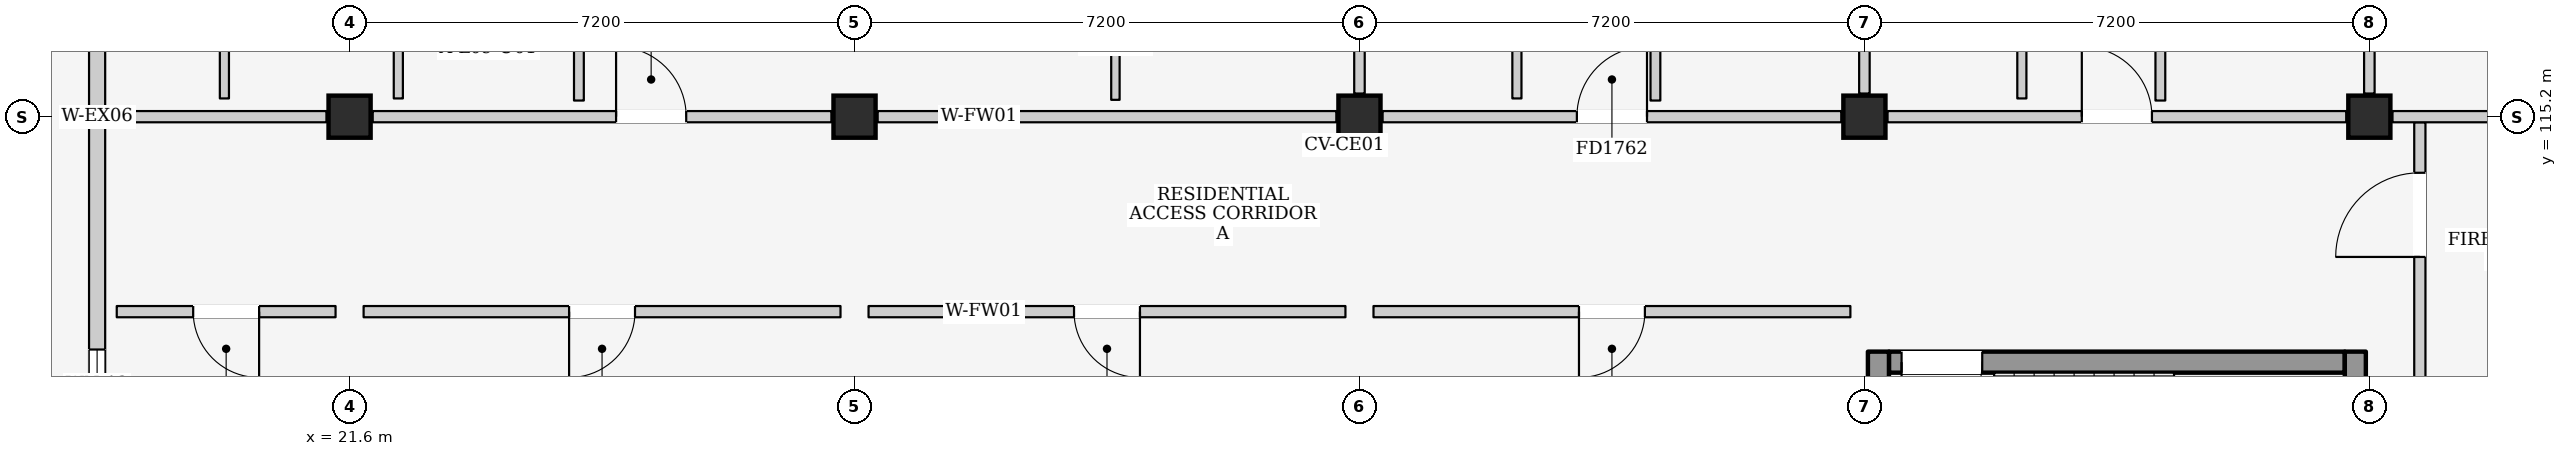
"""IFC4 building model, lengths in metres.
Left out: names, types, materials, properties, quantities, classifications, styles, units other than length and angle.
Written with IfcOpenShell. Run it as: python <this file> out.ifc"""

import sys

from ifc_helpers import new_model, si_unit, direction, frame, frame_2d, origin, origin_2d, place, context, subcontext, project, spatial, rectangle, extrude, element, fill, save


model = new_model("IFC4")
c1 = context("Model", 3, precision=1e-05, world=origin(), true_north=direction((0.0, 1.0)))
c2 = subcontext(c1, "Body", "Model", "MODEL_VIEW")
j1 = project(units=[si_unit("LENGTHUNIT", "METRE"), si_unit("PLANEANGLEUNIT", "RADIAN")], contexts=[c1])
p1 = place(None, origin())
s1 = spatial("IfcSite", under=j1, at=p1, CompositionType="ELEMENT")
p2 = place(p1, origin())
s2 = spatial("IfcBuilding", under=s1, at=p2, CompositionType="ELEMENT")
p3 = place(p2, frame((0.0, 0.0, 31.5)))
s3 = spatial("IfcBuildingStorey", under=s2, at=p3, CompositionType="ELEMENT", Elevation=31.5)
for number, where, z_axis, x_axis in (
    (1, (21.6, 115.2, 0.0), (0.0, 0.0, 1.0), (1.0, 0.0, 0.0)),
    (2, (28.8, 115.2, 0.0), (0.0, 0.0, 1.0), (1.0, 0.0, 0.0)),
    (3, (36.0, 115.2, 0.0), (0.0, 0.0, 1.0), (1.0, 0.0, 0.0)),
    (4, (43.2, 115.2, 0.0), (0.0, 0.0, 1.0), (1.0, 0.0, 0.0)),
    (5, (50.4, 115.2, 0.0), (0.0, 0.0, 1.0), (1.0, 0.0, 0.0)),
):
    element("IfcColumn", number, at=place(p3, frame(where, z_axis=z_axis, x_axis=x_axis)), inside=s3, PredefinedType="COLUMN", context=c2, shape_type="SweptSolid", body=[
        extrude(rectangle(XDim=0.6, YDim=0.6, at=origin_2d()), origin(), (0.0, 0.0, 1.0), 3.3),
    ])
p4 = place(p3, frame((18.0, 108.13, 0.0), z_axis=(0.0, 0.0, 1.0), x_axis=(0.0, 1.0, 0.0)))
e6 = element("IfcWall", 6, at=p4, inside=s3, PredefinedType="ELEMENTEDWALL", context=c2, shape_type="SweptSolid", body=[
    extrude(rectangle(XDim=7.07, YDim=0.23, at=frame_2d((3.535, 0.0))), origin(), (0.0, 0.0, 1.0), 2.515),
])
p5 = place(p4, frame((2.75, 0.0, 1.1)))
e7 = element("IfcOpeningElement", 7, at=p5, cuts=e6, PredefinedType="OPENING", context=c2, shape_type="SweptSolid", body=[
    extrude(rectangle(XDim=1.0, YDim=0.9, at=frame_2d((0.5, 0.45))), frame((0.0, 0.13, 0.0), z_axis=(0.0, -1.0, 0.0), x_axis=(1.0, 0.0, 0.0)), (0.0, 0.0, 1.0), 0.26),
])
p6 = place(p3, frame((18.0, 115.2, 0.0), z_axis=(0.0, 0.0, 1.0), x_axis=(0.0, 1.0, 0.0)))
e8 = element("IfcWall", 8, at=p6, inside=s3, PredefinedType="ELEMENTEDWALL", context=c2, shape_type="SweptSolid", body=[
    extrude(rectangle(XDim=7.07, YDim=0.23, at=frame_2d((3.535, 0.0))), origin(), (0.0, 0.0, 1.0), 2.515),
])
p7 = place(p6, frame((3.6, 0.0, 0.0)))
e9 = element("IfcOpeningElement", 9, at=p7, cuts=e8, PredefinedType="OPENING", context=c2, shape_type="SweptSolid", body=[
    extrude(rectangle(XDim=1.08, YDim=2.12, at=frame_2d((0.54, 1.06))), frame((0.0, 0.13, 0.0), z_axis=(0.0, -1.0, 0.0), x_axis=(1.0, 0.0, 0.0)), (0.0, 0.0, 1.0), 0.26),
])
p8 = place(p3, frame((43.55, 111.7, 0.0), z_axis=(0.0, 0.0, 1.0), x_axis=(1.0, 0.0, 0.0)))
e10 = element("IfcWall", 10, at=p8, inside=s3, PredefinedType="SHEAR", context=c2, shape_type="SweptSolid", body=[
    extrude(rectangle(XDim=6.5, YDim=0.3, at=frame_2d((3.25, 0.0))), origin(), (0.0, 0.0, 1.0), 3.08),
])
p9 = place(p8, frame((0.18, 0.0, 0.0)))
e11 = element("IfcOpeningElement", 11, at=p9, cuts=e10, PredefinedType="OPENING", context=c2, shape_type="SweptSolid", body=[
    extrude(rectangle(XDim=1.15, YDim=2.2, at=frame_2d((0.575, 1.1))), frame((0.0, 0.165, 0.0), z_axis=(0.0, -1.0, 0.0), x_axis=(1.0, 0.0, 0.0)), (0.0, 0.0, 1.0), 0.33),
])
for number, where, z_axis, x_axis in (
    (12, (43.4, 108.15, 0.0), (0.0, 0.0, 1.0), (0.0, 1.0, 0.0)),
    (13, (50.2, 108.15, 0.0), (0.0, 0.0, 1.0), (0.0, 1.0, 0.0)),
):
    element("IfcWall", number, at=place(p3, frame(where, z_axis=z_axis, x_axis=x_axis)), inside=s3, PredefinedType="SHEAR", context=c2, shape_type="SweptSolid", body=[
        extrude(rectangle(XDim=3.7, YDim=0.3, at=frame_2d((1.85, 0.0))), origin(), (0.0, 0.0, 1.0), 3.08),
    ])
p10 = place(p3, frame((51.12, 111.1, 0.0), z_axis=(0.0, 0.0, 1.0), x_axis=(0.0, 1.0, 0.0)))
e14 = element("IfcWall", 14, at=p10, inside=s3, PredefinedType="PARTITIONING", context=c2, shape_type="SweptSolid", body=[
    extrude(rectangle(XDim=4.02, YDim=0.16, at=frame_2d((2.01, 0.0))), origin(), (0.0, 0.0, 1.0), 3.08),
])
p11 = place(p10, frame((2.1, 0.0, 0.0)))
e15 = element("IfcOpeningElement", 15, at=p11, cuts=e14, PredefinedType="OPENING", context=c2, shape_type="SweptSolid", body=[
    extrude(rectangle(XDim=1.2, YDim=2.2, at=frame_2d((0.6, 1.1))), frame((0.0, 0.095, 0.0), z_axis=(0.0, -1.0, 0.0), x_axis=(1.0, 0.0, 0.0)), (0.0, 0.0, 1.0), 0.19),
])
p12 = place(p3, frame((18.28, 115.2, 0.0), z_axis=(0.0, 0.0, 1.0), x_axis=(1.0, 0.0, 0.0)))
e16 = element("IfcWall", 16, at=p12, inside=s3, PredefinedType="PARTITIONING", context=c2, shape_type="SweptSolid", body=[
    extrude(rectangle(XDim=2.99, YDim=0.16, at=frame_2d((1.495, 0.0))), origin(), (0.0, 0.0, 1.0), 2.415),
])
p13 = place(p3, frame((21.93, 115.2, 0.0), z_axis=(0.0, 0.0, 1.0), x_axis=(1.0, 0.0, 0.0)))
e17 = element("IfcWall", 17, at=p13, inside=s3, PredefinedType="PARTITIONING", context=c2, shape_type="SweptSolid", body=[
    extrude(rectangle(XDim=6.54, YDim=0.16, at=frame_2d((3.27, 0.0))), origin(), (0.0, 0.0, 1.0), 2.415),
])
p14 = place(p13, frame((3.47, 0.0, 0.0)))
e18 = element("IfcOpeningElement", 18, at=p14, cuts=e17, PredefinedType="OPENING", context=c2, shape_type="SweptSolid", body=[
    extrude(rectangle(XDim=1.0, YDim=2.15, at=frame_2d((0.5, 1.075))), frame((0.0, 0.095, 0.0), z_axis=(0.0, -1.0, 0.0), x_axis=(1.0, 0.0, 0.0)), (0.0, 0.0, 1.0), 0.19),
])
p15 = place(p3, frame((29.13, 115.2, 0.0), z_axis=(0.0, 0.0, 1.0), x_axis=(1.0, 0.0, 0.0)))
e19 = element("IfcWall", 19, at=p15, inside=s3, PredefinedType="PARTITIONING", context=c2, shape_type="SweptSolid", body=[
    extrude(rectangle(XDim=6.54, YDim=0.16, at=frame_2d((3.27, 0.0))), origin(), (0.0, 0.0, 1.0), 2.415),
])
p16 = place(p3, frame((36.0, 115.53, 0.0), z_axis=(0.0, 0.0, 1.0), x_axis=(0.0, 1.0, 0.0)))
e20 = element("IfcWall", 20, at=p16, inside=s3, PredefinedType="PARTITIONING", context=c2, shape_type="SweptSolid", body=[
    extrude(rectangle(XDim=6.54, YDim=0.15, at=frame_2d((3.27, 0.0))), origin(), (0.0, 0.0, 1.0), 2.565),
])
for number, where, z_axis, x_axis in (
    (21, (22.295, 115.46, 0.0), (0.0, 0.0, 1.0), (0.0, 1.0, 0.0)),
    (22, (19.815, 115.46, 0.0), (0.0, 0.0, 1.0), (0.0, 1.0, 0.0)),
):
    element("IfcWall", number, at=place(p3, frame(where, z_axis=z_axis, x_axis=x_axis)), inside=s3, PredefinedType="PARTITIONING", context=c2, shape_type="SweptSolid", body=[
        extrude(rectangle(XDim=3.04, YDim=0.13, at=frame_2d((1.52, 0.0))), origin(), (0.0, 0.0, 1.0), 3.08),
    ])
p17 = place(p3, frame((24.87, 115.43, 0.0), z_axis=(0.0, 0.0, 1.0), x_axis=(0.0, 1.0, 0.0)))
e23 = element("IfcWall", 23, at=p17, inside=s3, PredefinedType="PARTITIONING", context=c2, shape_type="SweptSolid", body=[
    extrude(rectangle(XDim=3.06, YDim=0.14, at=frame_2d((1.53, 0.0))), origin(), (0.0, 0.0, 1.0), 3.08),
])
p18 = place(p3, frame((32.52, 115.44, 0.0), z_axis=(0.0, 0.0, 1.0), x_axis=(0.0, 1.0, 0.0)))
e24 = element("IfcWall", 24, at=p18, inside=s3, PredefinedType="PARTITIONING", context=c2, shape_type="SweptSolid", body=[
    extrude(rectangle(XDim=3.04, YDim=0.12, at=frame_2d((1.52, 0.0))), origin(), (0.0, 0.0, 1.0), 3.08),
])
p19 = place(p18, frame((1.04, 0.0, 0.0)))
e25 = element("IfcOpeningElement", 25, at=p19, cuts=e24, PredefinedType="OPENING", context=c2, shape_type="SweptSolid", body=[
    extrude(rectangle(XDim=0.96, YDim=2.15, at=frame_2d((0.48, 1.075))), frame((0.0, 0.075, 0.0), z_axis=(0.0, -1.0, 0.0), x_axis=(1.0, 0.0, 0.0)), (0.0, 0.0, 1.0), 0.15),
])
p20 = place(p3, frame((36.33, 115.2, 0.0), z_axis=(0.0, 0.0, 1.0), x_axis=(1.0, 0.0, 0.0)))
e26 = element("IfcWall", 26, at=p20, inside=s3, PredefinedType="PARTITIONING", context=c2, shape_type="SweptSolid", body=[
    extrude(rectangle(XDim=6.54, YDim=0.16, at=frame_2d((3.27, 0.0))), origin(), (0.0, 0.0, 1.0), 2.415),
])
p21 = place(p20, frame((2.77, 0.0, 0.0)))
e27 = element("IfcOpeningElement", 27, at=p21, cuts=e26, PredefinedType="OPENING", context=c2, shape_type="SweptSolid", body=[
    extrude(rectangle(XDim=1.0, YDim=2.15, at=frame_2d((0.5, 1.075))), frame((0.0, 0.095, 0.0), z_axis=(0.0, -1.0, 0.0), x_axis=(1.0, 0.0, 0.0)), (0.0, 0.0, 1.0), 0.19),
])
p22 = place(p3, frame((43.2, 115.53, 0.0), z_axis=(0.0, 0.0, 1.0), x_axis=(0.0, 1.0, 0.0)))
e28 = element("IfcWall", 28, at=p22, inside=s3, PredefinedType="PARTITIONING", context=c2, shape_type="SweptSolid", body=[
    extrude(rectangle(XDim=6.54, YDim=0.15, at=frame_2d((3.27, 0.0))), origin(), (0.0, 0.0, 1.0), 2.565),
])
p23 = place(p3, frame((38.245, 115.46, 0.0), z_axis=(0.0, 0.0, 1.0), x_axis=(0.0, 1.0, 0.0)))
e29 = element("IfcWall", 29, at=p23, inside=s3, PredefinedType="PARTITIONING", context=c2, shape_type="SweptSolid", body=[
    extrude(rectangle(XDim=2.13, YDim=0.13, at=frame_2d((1.065, 0.0))), origin(), (0.0, 0.0, 1.0), 3.08),
])
p24 = place(p3, frame((40.22, 115.43, 0.0), z_axis=(0.0, 0.0, 1.0), x_axis=(0.0, 1.0, 0.0)))
e30 = element("IfcWall", 30, at=p24, inside=s3, PredefinedType="PARTITIONING", context=c2, shape_type="SweptSolid", body=[
    extrude(rectangle(XDim=2.15, YDim=0.14, at=frame_2d((1.075, 0.0))), origin(), (0.0, 0.0, 1.0), 3.08),
])
p25 = place(p3, frame((43.53, 115.2, 0.0), z_axis=(0.0, 0.0, 1.0), x_axis=(1.0, 0.0, 0.0)))
e31 = element("IfcWall", 31, at=p25, inside=s3, PredefinedType="PARTITIONING", context=c2, shape_type="SweptSolid", body=[
    extrude(rectangle(XDim=6.54, YDim=0.16, at=frame_2d((3.27, 0.0))), origin(), (0.0, 0.0, 1.0), 2.415),
])
p26 = place(p25, frame((2.77, 0.0, 0.0)))
e32 = element("IfcOpeningElement", 32, at=p26, cuts=e31, PredefinedType="OPENING", context=c2, shape_type="SweptSolid", body=[
    extrude(rectangle(XDim=1.0, YDim=2.15, at=frame_2d((0.5, 1.075))), frame((0.0, 0.095, 0.0), z_axis=(0.0, -1.0, 0.0), x_axis=(1.0, 0.0, 0.0)), (0.0, 0.0, 1.0), 0.19),
])
p27 = place(p3, frame((50.4, 115.53, 0.0), z_axis=(0.0, 0.0, 1.0), x_axis=(0.0, 1.0, 0.0)))
e33 = element("IfcWall", 33, at=p27, inside=s3, PredefinedType="PARTITIONING", context=c2, shape_type="SweptSolid", body=[
    extrude(rectangle(XDim=6.54, YDim=0.15, at=frame_2d((3.27, 0.0))), origin(), (0.0, 0.0, 1.0), 2.565),
])
p28 = place(p3, frame((45.445, 115.46, 0.0), z_axis=(0.0, 0.0, 1.0), x_axis=(0.0, 1.0, 0.0)))
e34 = element("IfcWall", 34, at=p28, inside=s3, PredefinedType="PARTITIONING", context=c2, shape_type="SweptSolid", body=[
    extrude(rectangle(XDim=2.13, YDim=0.13, at=frame_2d((1.065, 0.0))), origin(), (0.0, 0.0, 1.0), 3.08),
])
p29 = place(p3, frame((47.42, 115.43, 0.0), z_axis=(0.0, 0.0, 1.0), x_axis=(0.0, 1.0, 0.0)))
e35 = element("IfcWall", 35, at=p29, inside=s3, PredefinedType="PARTITIONING", context=c2, shape_type="SweptSolid", body=[
    extrude(rectangle(XDim=2.15, YDim=0.14, at=frame_2d((1.075, 0.0))), origin(), (0.0, 0.0, 1.0), 3.08),
])
p30 = place(p3, frame((50.73, 115.2, 0.0), z_axis=(0.0, 0.0, 1.0), x_axis=(1.0, 0.0, 0.0)))
e36 = element("IfcWall", 36, at=p30, inside=s3, PredefinedType="PARTITIONING", context=c2, shape_type="SweptSolid", body=[
    extrude(rectangle(XDim=6.54, YDim=0.16, at=frame_2d((3.27, 0.0))), origin(), (0.0, 0.0, 1.0), 2.415),
])
p31 = place(p3, frame((18.28, 112.42, 0.0), z_axis=(0.0, 0.0, 1.0), x_axis=(1.0, 0.0, 0.0)))
e37 = element("IfcWall", 37, at=p31, inside=s3, PredefinedType="PARTITIONING", context=c2, shape_type="SweptSolid", body=[
    extrude(rectangle(XDim=3.12, YDim=0.16, at=frame_2d((1.56, 0.0))), origin(), (0.0, 0.0, 1.0), 3.08),
])
p32 = place(p31, frame((1.09, 0.0, 0.0)))
e38 = element("IfcOpeningElement", 38, at=p32, cuts=e37, PredefinedType="OPENING", context=c2, shape_type="SweptSolid", body=[
    extrude(rectangle(XDim=0.94, YDim=2.12, at=frame_2d((0.47, 1.06))), frame((0.0, 0.095, 0.0), z_axis=(0.0, -1.0, 0.0), x_axis=(1.0, 0.0, 0.0)), (0.0, 0.0, 1.0), 0.19),
])
p33 = place(p3, frame((21.8, 112.42, 0.0), z_axis=(0.0, 0.0, 1.0), x_axis=(1.0, 0.0, 0.0)))
e39 = element("IfcWall", 39, at=p33, inside=s3, PredefinedType="PARTITIONING", context=c2, shape_type="SweptSolid", body=[
    extrude(rectangle(XDim=6.8, YDim=0.16, at=frame_2d((3.4, 0.0))), origin(), (0.0, 0.0, 1.0), 3.08),
])
p34 = place(p33, frame((2.93, 0.0, 0.0)))
e40 = element("IfcOpeningElement", 40, at=p34, cuts=e39, PredefinedType="OPENING", context=c2, shape_type="SweptSolid", body=[
    extrude(rectangle(XDim=0.94, YDim=2.12, at=frame_2d((0.47, 1.06))), frame((0.0, 0.095, 0.0), z_axis=(0.0, -1.0, 0.0), x_axis=(1.0, 0.0, 0.0)), (0.0, 0.0, 1.0), 0.19),
])
p35 = place(p3, frame((29.0, 112.42, 0.0), z_axis=(0.0, 0.0, 1.0), x_axis=(1.0, 0.0, 0.0)))
e41 = element("IfcWall", 41, at=p35, inside=s3, PredefinedType="PARTITIONING", context=c2, shape_type="SweptSolid", body=[
    extrude(rectangle(XDim=6.8, YDim=0.16, at=frame_2d((3.4, 0.0))), origin(), (0.0, 0.0, 1.0), 3.08),
])
p36 = place(p35, frame((2.93, 0.0, 0.0)))
e42 = element("IfcOpeningElement", 42, at=p36, cuts=e41, PredefinedType="OPENING", context=c2, shape_type="SweptSolid", body=[
    extrude(rectangle(XDim=0.94, YDim=2.12, at=frame_2d((0.47, 1.06))), frame((0.0, 0.095, 0.0), z_axis=(0.0, -1.0, 0.0), x_axis=(1.0, 0.0, 0.0)), (0.0, 0.0, 1.0), 0.19),
])
p37 = place(p3, frame((36.2, 112.42, 0.0), z_axis=(0.0, 0.0, 1.0), x_axis=(1.0, 0.0, 0.0)))
e43 = element("IfcWall", 43, at=p37, inside=s3, PredefinedType="PARTITIONING", context=c2, shape_type="SweptSolid", body=[
    extrude(rectangle(XDim=6.8, YDim=0.16, at=frame_2d((3.4, 0.0))), origin(), (0.0, 0.0, 1.0), 3.08),
])
p38 = place(p37, frame((2.93, 0.0, 0.0)))
e44 = element("IfcOpeningElement", 44, at=p38, cuts=e43, PredefinedType="OPENING", context=c2, shape_type="SweptSolid", body=[
    extrude(rectangle(XDim=0.94, YDim=2.12, at=frame_2d((0.47, 1.06))), frame((0.0, 0.095, 0.0), z_axis=(0.0, -1.0, 0.0), x_axis=(1.0, 0.0, 0.0)), (0.0, 0.0, 1.0), 0.19),
])
p39 = place(p5, origin())
e45 = element("IfcWindow", 45, at=p39, inside=s3, PartitioningType="SINGLE_PANEL", PredefinedType="WINDOW", context=c2, shape_type="SweptSolid", body=[
    extrude(rectangle(XDim=1.0, YDim=0.9, at=frame_2d((0.5, 0.45))), frame((0.0, 0.03, 0.0), z_axis=(0.0, -1.0, 0.0), x_axis=(1.0, 0.0, 0.0)), (0.0, 0.0, 1.0), 0.06),
])
fill(e7, e45)
p40 = place(p9, frame((1.15, 0.0, 0.0), z_axis=(0.0, 0.0, 1.0), x_axis=(-1.0, 0.0, 0.0)))
e46 = element("IfcDoor", 46, at=p40, inside=s3, OperationType="SINGLE_SWING_RIGHT", PredefinedType="DOOR", context=c2, shape_type="SweptSolid", body=[
    extrude(rectangle(XDim=1.15, YDim=2.2, at=frame_2d((0.575, 1.1))), frame((0.0, 0.025, 0.0), z_axis=(0.0, -1.0, 0.0), x_axis=(1.0, 0.0, 0.0)), (0.0, 0.0, 1.0), 0.05),
])
fill(e11, e46)
p41 = place(p11, origin())
e47 = element("IfcDoor", 47, at=p41, inside=s3, OperationType="SINGLE_SWING_LEFT", PredefinedType="DOOR", context=c2, shape_type="SweptSolid", body=[
    extrude(rectangle(XDim=1.2, YDim=2.2, at=frame_2d((0.6, 1.1))), frame((0.0, 0.025, 0.0), z_axis=(0.0, -1.0, 0.0), x_axis=(1.0, 0.0, 0.0)), (0.0, 0.0, 1.0), 0.05),
])
fill(e15, e47)
p42 = place(p14, origin())
e48 = element("IfcDoor", 48, at=p42, inside=s3, OperationType="SINGLE_SWING_LEFT", PredefinedType="DOOR", context=c2, shape_type="SweptSolid", body=[
    extrude(rectangle(XDim=1.0, YDim=2.15, at=frame_2d((0.5, 1.075))), frame((0.0, 0.025, 0.0), z_axis=(0.0, -1.0, 0.0), x_axis=(1.0, 0.0, 0.0)), (0.0, 0.0, 1.0), 0.05),
])
fill(e18, e48)
p43 = place(p21, origin())
e49 = element("IfcDoor", 49, at=p43, inside=s3, OperationType="SINGLE_SWING_RIGHT", PredefinedType="DOOR", context=c2, shape_type="SweptSolid", body=[
    extrude(rectangle(XDim=1.0, YDim=2.15, at=frame_2d((0.5, 1.075))), frame((0.0, 0.025, 0.0), z_axis=(0.0, -1.0, 0.0), x_axis=(1.0, 0.0, 0.0)), (0.0, 0.0, 1.0), 0.05),
])
fill(e27, e49)
p44 = place(p26, origin())
e50 = element("IfcDoor", 50, at=p44, inside=s3, OperationType="SINGLE_SWING_LEFT", PredefinedType="DOOR", context=c2, shape_type="SweptSolid", body=[
    extrude(rectangle(XDim=1.0, YDim=2.15, at=frame_2d((0.5, 1.075))), frame((0.0, 0.025, 0.0), z_axis=(0.0, -1.0, 0.0), x_axis=(1.0, 0.0, 0.0)), (0.0, 0.0, 1.0), 0.05),
])
fill(e32, e50)
p45 = place(p32, frame((0.94, 0.0, 0.0), z_axis=(0.0, 0.0, 1.0), x_axis=(-1.0, 0.0, 0.0)))
e51 = element("IfcDoor", 51, at=p45, inside=s3, OperationType="SINGLE_SWING_LEFT", PredefinedType="DOOR", context=c2, shape_type="SweptSolid", body=[
    extrude(rectangle(XDim=0.94, YDim=2.12, at=frame_2d((0.47, 1.06))), frame((0.0, 0.025, 0.0), z_axis=(0.0, -1.0, 0.0), x_axis=(1.0, 0.0, 0.0)), (0.0, 0.0, 1.0), 0.05),
])
fill(e38, e51)
p46 = place(p34, frame((0.94, 0.0, 0.0), z_axis=(0.0, 0.0, 1.0), x_axis=(-1.0, 0.0, 0.0)))
e52 = element("IfcDoor", 52, at=p46, inside=s3, OperationType="SINGLE_SWING_RIGHT", PredefinedType="DOOR", context=c2, shape_type="SweptSolid", body=[
    extrude(rectangle(XDim=0.94, YDim=2.12, at=frame_2d((0.47, 1.06))), frame((0.0, 0.025, 0.0), z_axis=(0.0, -1.0, 0.0), x_axis=(1.0, 0.0, 0.0)), (0.0, 0.0, 1.0), 0.05),
])
fill(e40, e52)
p47 = place(p36, frame((0.94, 0.0, 0.0), z_axis=(0.0, 0.0, 1.0), x_axis=(-1.0, 0.0, 0.0)))
e53 = element("IfcDoor", 53, at=p47, inside=s3, OperationType="SINGLE_SWING_LEFT", PredefinedType="DOOR", context=c2, shape_type="SweptSolid", body=[
    extrude(rectangle(XDim=0.94, YDim=2.12, at=frame_2d((0.47, 1.06))), frame((0.0, 0.025, 0.0), z_axis=(0.0, -1.0, 0.0), x_axis=(1.0, 0.0, 0.0)), (0.0, 0.0, 1.0), 0.05),
])
fill(e42, e53)
p48 = place(p38, frame((0.94, 0.0, 0.0), z_axis=(0.0, 0.0, 1.0), x_axis=(-1.0, 0.0, 0.0)))
e54 = element("IfcDoor", 54, at=p48, inside=s3, OperationType="SINGLE_SWING_RIGHT", PredefinedType="DOOR", context=c2, shape_type="SweptSolid", body=[
    extrude(rectangle(XDim=0.94, YDim=2.12, at=frame_2d((0.47, 1.06))), frame((0.0, 0.025, 0.0), z_axis=(0.0, -1.0, 0.0), x_axis=(1.0, 0.0, 0.0)), (0.0, 0.0, 1.0), 0.05),
])
fill(e44, e54)
save(model, sys.argv[1])
